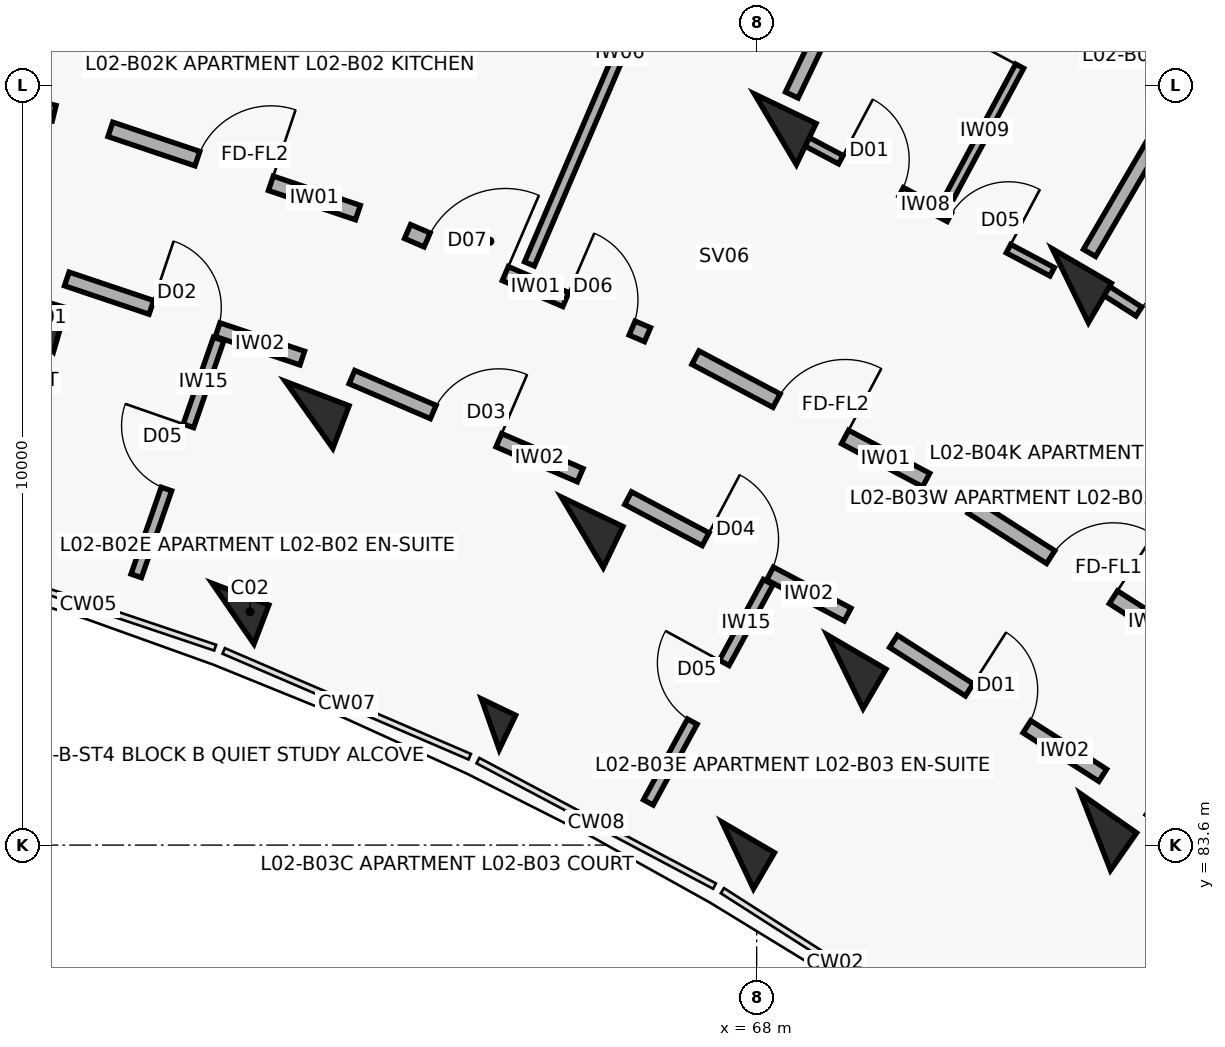
"""IFC4 building model, lengths in metres.
Left out: names, types, materials, properties, quantities, classifications, styles, units other than length and angle.
Written with IfcOpenShell. Run it as: python <this file> out.ifc"""

import sys

from ifc_helpers import new_model, si_unit, direction, frame, frame_2d, origin, origin_2d, place, context, subcontext, project, spatial, rectangle, extrude, element, fill, save


model = new_model("IFC4")
c1 = context("Model", 3, precision=1e-05, world=origin(), true_north=direction((0.0, 1.0)))
c2 = subcontext(c1, "Body", "Model", "MODEL_VIEW")
j1 = project(units=[si_unit("LENGTHUNIT", "METRE"), si_unit("PLANEANGLEUNIT", "RADIAN")], contexts=[c1])
p1 = place(None, origin())
s1 = spatial("IfcSite", under=j1, at=p1, CompositionType="ELEMENT")
p2 = place(p1, origin())
s2 = spatial("IfcBuilding", under=s1, at=p2, CompositionType="ELEMENT")
p3 = place(p2, frame((0.0, 0.0, 8.1)))
s3 = spatial("IfcBuildingStorey", under=s2, at=p3, CompositionType="ELEMENT", Elevation=8.1)
p4 = place(p3, frame((58.401, 90.508, 0.0), z_axis=(0.0, 0.0, 1.0), x_axis=(0.27966144946, 0.96009867914, 0.0)))
e1 = element("IfcColumn", 1, at=p4, inside=s3, PredefinedType="COLUMN", context=c2, shape_type="SweptSolid", body=[
    extrude(rectangle(XDim=0.6, YDim=0.9, at=origin_2d()), origin(), (0.0, 0.0, 1.0), 3.1),
])
p5 = place(p3, frame((61.111, 86.646, 0.0), z_axis=(0.0, 0.0, 1.0), x_axis=(0.357064076459, 0.934079892355, 0.0)))
e2 = element("IfcColumn", 2, at=p5, inside=s3, PredefinedType="COLUMN", context=c2, shape_type="SweptSolid", body=[
    extrude(rectangle(XDim=0.55, YDim=0.8, at=origin_2d()), origin(), (0.0, 0.0, 1.0), 3.1),
])
p6 = place(p3, frame((62.111, 89.261, 0.0), z_axis=(0.0, 0.0, 1.0), x_axis=(0.357064076459, 0.934079892355, 0.0)))
e3 = element("IfcColumn", 3, at=p6, inside=s3, PredefinedType="COLUMN", context=c2, shape_type="SweptSolid", body=[
    extrude(rectangle(XDim=0.6, YDim=0.9, at=origin_2d()), origin(), (0.0, 0.0, 1.0), 3.1),
])
p7 = place(p3, frame((64.496, 85.191, 0.0), z_axis=(0.0, 0.0, 1.0), x_axis=(0.432085748802, 0.901832526405, 0.0)))
e4 = element("IfcColumn", 4, at=p7, inside=s3, PredefinedType="COLUMN", context=c2, shape_type="SweptSolid", body=[
    extrude(rectangle(XDim=0.5, YDim=0.5, at=origin_2d()), origin(), (0.0, 0.0, 1.0), 3.1),
])
for number, where, z_axis, x_axis in (
    (5, (65.706, 87.716, 0.0), (0.0, 0.0, 1.0), (0.432, 0.902, 0.0)),
    (6, (68.246, 93.019, 0.0), (0.0, 0.0, 1.0), (0.432, 0.902, 0.0)),
):
    element("IfcColumn", number, at=place(p3, frame(where, z_axis=z_axis, x_axis=x_axis)), inside=s3, PredefinedType="COLUMN", context=c2, shape_type="SweptSolid", body=[
        extrude(rectangle(XDim=0.6, YDim=0.9, at=origin_2d()), origin(), (0.0, 0.0, 1.0), 3.1),
    ])
p8 = place(p3, frame((67.751, 83.464, 0.0), z_axis=(0.0, 0.0, 1.0), x_axis=(0.504226211181, 0.863571611366, 0.0)))
e7 = element("IfcColumn", 7, at=p8, inside=s3, PredefinedType="COLUMN", context=c2, shape_type="SweptSolid", body=[
    extrude(rectangle(XDim=0.55, YDim=0.8, at=origin_2d()), origin(), (0.0, 0.0, 1.0), 3.1),
])
for number, where, z_axis, x_axis in (
    (8, (69.163, 85.882, 0.0), (0.0, 0.0, 1.0), (0.504, 0.864, 0.0)),
    (9, (72.127, 90.96, 0.0), (0.0, 0.0, 1.0), (0.504, 0.864, 0.0)),
    (10, (72.458, 83.773, 0.0), (0.0, 0.0, 1.0), (0.573, 0.82, 0.0)),
):
    element("IfcColumn", number, at=place(p3, frame(where, z_axis=z_axis, x_axis=x_axis)), inside=s3, PredefinedType="COLUMN", context=c2, shape_type="SweptSolid", body=[
        extrude(rectangle(XDim=0.6, YDim=0.9, at=origin_2d()), origin(), (0.0, 0.0, 1.0), 3.1),
    ])
p9 = place(p3, frame((55.558, 94.022, 0.0), z_axis=(0.0, 0.0, 1.0), x_axis=(0.970719238682, -0.240216901263, 0.0)))
e11 = element("IfcWall", 11, at=p9, inside=s3, PredefinedType="SOLIDWALL", context=c2, shape_type="SweptSolid", body=[
    extrude(rectangle(XDim=3.296, YDim=0.21, at=frame_2d((1.648, 0.0))), origin(), (0.0, 0.0, 1.0), 2.08),
])
p10 = place(p9, frame((0.45, 0.0, 0.0)))
e12 = element("IfcOpeningElement", 12, at=p10, cuts=e11, PredefinedType="OPENING", context=c2, shape_type="SweptSolid", body=[
    extrude(rectangle(XDim=1.1, YDim=2.15, at=frame_2d((0.55, 1.075))), frame((0.0, 0.115, 0.0), z_axis=(0.0, -1.0, 0.0), x_axis=(1.0, 0.0, 0.0)), (0.0, 0.0, 1.0), 0.23),
])
p11 = place(p9, frame((1.726, 0.0, 0.0)))
e13 = element("IfcOpeningElement", 13, at=p11, cuts=e11, PredefinedType="OPENING", context=c2, shape_type="SweptSolid", body=[
    extrude(rectangle(XDim=1.12, YDim=2.15, at=frame_2d((0.56, 1.075))), frame((0.0, 0.115, 0.0), z_axis=(0.0, -1.0, 0.0), x_axis=(1.0, 0.0, 0.0)), (0.0, 0.0, 1.0), 0.23),
])
p12 = place(p3, frame((59.497, 93.018, 0.0), z_axis=(0.0, 0.0, 1.0), x_axis=(0.947863007629, -0.318678080151, 0.0)))
e14 = element("IfcWall", 14, at=p12, inside=s3, PredefinedType="SOLIDWALL", context=c2, shape_type="SweptSolid", body=[
    extrude(rectangle(XDim=3.436, YDim=0.2, at=frame_2d((1.718, 0.0))), origin(), (0.0, 0.0, 1.0), 2.08),
])
p13 = place(p12, frame((1.208, 0.0, 0.0)))
e15 = element("IfcOpeningElement", 15, at=p13, cuts=e14, PredefinedType="OPENING", context=c2, shape_type="SweptSolid", body=[
    extrude(rectangle(XDim=1.02, YDim=2.15, at=frame_2d((0.51, 1.075))), frame((0.0, 0.11, 0.0), z_axis=(0.0, -1.0, 0.0), x_axis=(1.0, 0.0, 0.0)), (0.0, 0.0, 1.0), 0.22),
])
p14 = place(p3, frame((58.923, 91.049, 0.0), z_axis=(0.0, 0.0, 1.0), x_axis=(0.94787351033, -0.318646839643, 0.0)))
e16 = element("IfcWall", 16, at=p14, inside=s3, PredefinedType="SOLIDWALL", context=c2, shape_type="SweptSolid", body=[
    extrude(rectangle(XDim=3.269, YDim=0.19, at=frame_2d((1.634, 0.0))), origin(), (0.0, 0.0, 1.0), 2.08),
])
p15 = place(p14, frame((1.174, 0.0, 0.0)))
e17 = element("IfcOpeningElement", 17, at=p15, cuts=e16, PredefinedType="OPENING", context=c2, shape_type="SweptSolid", body=[
    extrude(rectangle(XDim=0.92, YDim=2.1, at=frame_2d((0.46, 1.05))), frame((0.0, 0.105, 0.0), z_axis=(0.0, -1.0, 0.0), x_axis=(1.0, 0.0, 0.0)), (0.0, 0.0, 1.0), 0.21),
])
p16 = place(p3, frame((59.837, 87.143, 0.0), z_axis=(0.0, 0.0, 1.0), x_axis=(0.328629662527, 0.944458863534, 0.0)))
e18 = element("IfcWall", 18, at=p16, inside=s3, PredefinedType="PARTITIONING", context=c2, shape_type="SweptSolid", body=[
    extrude(rectangle(XDim=3.3, YDim=0.145, at=frame_2d((1.65, 0.0))), origin(), (0.0, 0.0, 1.0), 2.08),
])
p17 = place(p16, frame((1.21, 0.0, 0.0)))
e19 = element("IfcOpeningElement", 19, at=p17, cuts=e18, PredefinedType="OPENING", context=c2, shape_type="SweptSolid", body=[
    extrude(rectangle(XDim=0.88, YDim=2.1, at=frame_2d((0.44, 1.05))), frame((0.0, 0.083, 0.0), z_axis=(0.0, -1.0, 0.0), x_axis=(1.0, 0.0, 0.0)), (0.0, 0.0, 1.0), 0.165),
])
p18 = place(p3, frame((63.407, 91.673, 0.0), z_axis=(0.0, 0.0, 1.0), x_axis=(0.918718172399, -0.394913813008, 0.0)))
e20 = element("IfcWall", 20, at=p18, inside=s3, PredefinedType="SOLIDWALL", context=c2, shape_type="SweptSolid", body=[
    extrude(rectangle(XDim=3.436, YDim=0.2, at=frame_2d((1.718, 0.0))), origin(), (0.0, 0.0, 1.0), 2.08),
])
p19 = place(p18, frame((0.28, 0.0, 0.0)))
e21 = element("IfcOpeningElement", 21, at=p19, cuts=e20, PredefinedType="OPENING", context=c2, shape_type="SweptSolid", body=[
    extrude(rectangle(XDim=1.12, YDim=2.15, at=frame_2d((0.56, 1.075))), frame((0.0, 0.11, 0.0), z_axis=(0.0, -1.0, 0.0), x_axis=(1.0, 0.0, 0.0)), (0.0, 0.0, 1.0), 0.22),
])
p20 = place(p18, frame((2.266, 0.0, 0.0)))
e22 = element("IfcOpeningElement", 22, at=p20, cuts=e20, PredefinedType="OPENING", context=c2, shape_type="SweptSolid", body=[
    extrude(rectangle(XDim=0.95, YDim=2.1, at=frame_2d((0.475, 1.05))), frame((0.0, 0.11, 0.0), z_axis=(0.0, -1.0, 0.0), x_axis=(1.0, 0.0, 0.0)), (0.0, 0.0, 1.0), 0.22),
])
p21 = place(p3, frame((62.675, 89.758, 0.0), z_axis=(0.0, 0.0, 1.0), x_axis=(0.918723391052, -0.394901672235, 0.0)))
e23 = element("IfcWall", 23, at=p21, inside=s3, PredefinedType="SOLIDWALL", context=c2, shape_type="SweptSolid", body=[
    extrude(rectangle(XDim=3.269, YDim=0.19, at=frame_2d((1.634, 0.0))), origin(), (0.0, 0.0, 1.0), 2.08),
])
p22 = place(p21, frame((1.164, 0.0, 0.0)))
e24 = element("IfcOpeningElement", 24, at=p22, cuts=e23, PredefinedType="OPENING", context=c2, shape_type="SweptSolid", body=[
    extrude(rectangle(XDim=0.94, YDim=2.1, at=frame_2d((0.47, 1.05))), frame((0.0, 0.105, 0.0), z_axis=(0.0, -1.0, 0.0), x_axis=(1.0, 0.0, 0.0)), (0.0, 0.0, 1.0), 0.21),
])
p23 = place(p3, frame((65.01, 91.247, 0.0), z_axis=(0.0, 0.0, 1.0), x_axis=(0.393511564709, 0.919319666079, 0.0)))
e25 = element("IfcWall", 25, at=p23, inside=s3, PredefinedType="PARTITIONING", context=c2, shape_type="SweptSolid", body=[
    extrude(rectangle(XDim=7.95, YDim=0.14, at=frame_2d((3.975, 0.0))), origin(), (0.0, 0.0, 1.0), 2.08),
])
p24 = place(p23, frame((6.05, 0.0, 0.0)))
e26 = element("IfcOpeningElement", 26, at=p24, cuts=e25, PredefinedType="OPENING", context=c2, shape_type="SweptSolid", body=[
    extrude(rectangle(XDim=0.92, YDim=2.1, at=frame_2d((0.46, 1.05))), frame((0.0, 0.08, 0.0), z_axis=(0.0, -1.0, 0.0), x_axis=(1.0, 0.0, 0.0)), (0.0, 0.0, 1.0), 0.16),
])
p25 = place(p3, frame((67.194, 90.014, 0.0), z_axis=(0.0, 0.0, 1.0), x_axis=(0.883410853063, -0.468599258099, 0.0)))
e27 = element("IfcWall", 27, at=p25, inside=s3, PredefinedType="SOLIDWALL", context=c2, shape_type="SweptSolid", body=[
    extrude(rectangle(XDim=3.436, YDim=0.2, at=frame_2d((1.718, 0.0))), origin(), (0.0, 0.0, 1.0), 2.08),
])
p26 = place(p25, frame((1.208, 0.0, 0.0)))
e28 = element("IfcOpeningElement", 28, at=p26, cuts=e27, PredefinedType="OPENING", context=c2, shape_type="SweptSolid", body=[
    extrude(rectangle(XDim=1.02, YDim=2.15, at=frame_2d((0.51, 1.075))), frame((0.0, 0.11, 0.0), z_axis=(0.0, -1.0, 0.0), x_axis=(1.0, 0.0, 0.0)), (0.0, 0.0, 1.0), 0.22),
])
p27 = place(p3, frame((66.309, 88.165, 0.0), z_axis=(0.0, 0.0, 1.0), x_axis=(0.883444301944, -0.468536194293, 0.0)))
e29 = element("IfcWall", 29, at=p27, inside=s3, PredefinedType="SOLIDWALL", context=c2, shape_type="SweptSolid", body=[
    extrude(rectangle(XDim=3.269, YDim=0.19, at=frame_2d((1.634, 0.0))), origin(), (0.0, 0.0, 1.0), 2.08),
])
p28 = place(p27, frame((1.154, 0.0, 0.0)))
e30 = element("IfcOpeningElement", 30, at=p28, cuts=e29, PredefinedType="OPENING", context=c2, shape_type="SweptSolid", body=[
    extrude(rectangle(XDim=0.96, YDim=2.1, at=frame_2d((0.48, 1.05))), frame((0.0, 0.105, 0.0), z_axis=(0.0, -1.0, 0.0), x_axis=(1.0, 0.0, 0.0)), (0.0, 0.0, 1.0), 0.21),
])
p29 = place(p3, frame((66.575, 84.162, 0.0), z_axis=(0.0, 0.0, 1.0), x_axis=(0.477841058477, 0.878446311868, 0.0)))
e31 = element("IfcWall", 31, at=p29, inside=s3, PredefinedType="PARTITIONING", context=c2, shape_type="SweptSolid", body=[
    extrude(rectangle(XDim=3.3, YDim=0.145, at=frame_2d((1.65, 0.0))), origin(), (0.0, 0.0, 1.0), 2.08),
])
p30 = place(p29, frame((1.21, 0.0, 0.0)))
e32 = element("IfcOpeningElement", 32, at=p30, cuts=e31, PredefinedType="OPENING", context=c2, shape_type="SweptSolid", body=[
    extrude(rectangle(XDim=0.88, YDim=2.1, at=frame_2d((0.44, 1.05))), frame((0.0, 0.083, 0.0), z_axis=(0.0, -1.0, 0.0), x_axis=(1.0, 0.0, 0.0)), (0.0, 0.0, 1.0), 0.165),
])
p31 = place(p3, frame((68.533, 92.923, 0.0), z_axis=(0.0, 0.0, 1.0), x_axis=(0.88341855112, -0.46858474531, 0.0)))
e33 = element("IfcWall", 33, at=p31, inside=s3, PredefinedType="PARTITIONING", context=c2, shape_type="SweptSolid", body=[
    extrude(rectangle(XDim=3.797, YDim=0.125, at=frame_2d((1.898, 0.0))), origin(), (0.0, 0.0, 1.0), 2.08),
])
p32 = place(p31, frame((0.65, 0.0, 0.0)))
e34 = element("IfcOpeningElement", 34, at=p32, cuts=e33, PredefinedType="OPENING", context=c2, shape_type="SweptSolid", body=[
    extrude(rectangle(XDim=0.9, YDim=2.1, at=frame_2d((0.45, 1.05))), frame((0.0, 0.073, 0.0), z_axis=(0.0, -1.0, 0.0), x_axis=(1.0, 0.0, 0.0)), (0.0, 0.0, 1.0), 0.145),
])
p33 = place(p31, frame((2.267, 0.0, 0.0)))
e35 = element("IfcOpeningElement", 35, at=p33, cuts=e33, PredefinedType="OPENING", context=c2, shape_type="SweptSolid", body=[
    extrude(rectangle(XDim=0.88, YDim=2.1, at=frame_2d((0.44, 1.05))), frame((0.0, 0.073, 0.0), z_axis=(0.0, -1.0, 0.0), x_axis=(1.0, 0.0, 0.0)), (0.0, 0.0, 1.0), 0.145),
])
p34 = place(p3, frame((70.541, 92.135, 0.0), z_axis=(0.0, 0.0, 1.0), x_axis=(0.472542158723, 0.881308066586, 0.0)))
e36 = element("IfcWall", 36, at=p34, inside=s3, PredefinedType="PARTITIONING", context=c2, shape_type="SweptSolid", body=[
    extrude(rectangle(XDim=4.9, YDim=0.12, at=frame_2d((2.45, 0.0))), origin(), (0.0, 0.0, 1.0), 2.08),
])
p35 = place(p34, frame((1.945, 0.0, 0.0)))
e37 = element("IfcOpeningElement", 37, at=p35, cuts=e36, PredefinedType="OPENING", context=c2, shape_type="SweptSolid", body=[
    extrude(rectangle(XDim=1.01, YDim=2.1, at=frame_2d((0.505, 1.05))), frame((0.0, 0.07, 0.0), z_axis=(0.0, -1.0, 0.0), x_axis=(1.0, 0.0, 0.0)), (0.0, 0.0, 1.0), 0.14),
])
p36 = place(p3, frame((68.462, 93.469, 0.0), z_axis=(0.0, 0.0, 1.0), x_axis=(0.432086898897, 0.901831975371, 0.0)))
e38 = element("IfcWall", 38, at=p36, inside=s3, PredefinedType="SOLIDWALL", context=c2, shape_type="SweptSolid", body=[
    extrude(rectangle(XDim=4.35, YDim=0.185, at=frame_2d((2.175, 0.0))), origin(), (0.0, 0.0, 1.0), 2.08),
])
p37 = place(p3, frame((70.834, 88.051, 0.0), z_axis=(0.0, 0.0, 1.0), x_axis=(0.842257205985, -0.539075874963, 0.0)))
e39 = element("IfcWall", 39, at=p37, inside=s3, PredefinedType="SOLIDWALL", context=c2, shape_type="SweptSolid", body=[
    extrude(rectangle(XDim=3.436, YDim=0.2, at=frame_2d((1.718, 0.0))), origin(), (0.0, 0.0, 1.0), 2.08),
])
p38 = place(p37, frame((1.228, 0.0, 0.0)))
e40 = element("IfcOpeningElement", 40, at=p38, cuts=e39, PredefinedType="OPENING", context=c2, shape_type="SweptSolid", body=[
    extrude(rectangle(XDim=0.98, YDim=2.15, at=frame_2d((0.49, 1.075))), frame((0.0, 0.11, 0.0), z_axis=(0.0, -1.0, 0.0), x_axis=(1.0, 0.0, 0.0)), (0.0, 0.0, 1.0), 0.22),
])
p39 = place(p3, frame((69.8, 86.281, 0.0), z_axis=(0.0, 0.0, 1.0), x_axis=(0.842225276846, -0.539125758095, 0.0)))
e41 = element("IfcWall", 41, at=p39, inside=s3, PredefinedType="SOLIDWALL", context=c2, shape_type="SweptSolid", body=[
    extrude(rectangle(XDim=3.269, YDim=0.19, at=frame_2d((1.634, 0.0))), origin(), (0.0, 0.0, 1.0), 2.08),
])
p40 = place(p39, frame((1.184, 0.0, 0.0)))
e42 = element("IfcOpeningElement", 42, at=p40, cuts=e41, PredefinedType="OPENING", context=c2, shape_type="SweptSolid", body=[
    extrude(rectangle(XDim=0.9, YDim=2.1, at=frame_2d((0.45, 1.05))), frame((0.0, 0.105, 0.0), z_axis=(0.0, -1.0, 0.0), x_axis=(1.0, 0.0, 0.0)), (0.0, 0.0, 1.0), 0.21),
])
p41 = place(p3, frame((72.481, 90.971, 0.0), z_axis=(0.0, 0.0, 1.0), x_axis=(0.842238809758, -0.53910461632, 0.0)))
e43 = element("IfcWall", 43, at=p41, inside=s3, PredefinedType="PARTITIONING", context=c2, shape_type="SweptSolid", body=[
    extrude(rectangle(XDim=3.81, YDim=0.14, at=frame_2d((1.905, 0.0))), origin(), (0.0, 0.0, 1.0), 2.08),
])
p42 = place(p41, frame((0.65, 0.0, 0.0)))
e44 = element("IfcOpeningElement", 44, at=p42, cuts=e43, PredefinedType="OPENING", context=c2, shape_type="SweptSolid", body=[
    extrude(rectangle(XDim=0.9, YDim=2.1, at=frame_2d((0.45, 1.05))), frame((0.0, 0.08, 0.0), z_axis=(0.0, -1.0, 0.0), x_axis=(1.0, 0.0, 0.0)), (0.0, 0.0, 1.0), 0.16),
])
p43 = place(p41, frame((2.28, 0.0, 0.0)))
e45 = element("IfcOpeningElement", 45, at=p43, cuts=e43, PredefinedType="OPENING", context=c2, shape_type="SweptSolid", body=[
    extrude(rectangle(XDim=0.88, YDim=2.1, at=frame_2d((0.44, 1.05))), frame((0.0, 0.08, 0.0), z_axis=(0.0, -1.0, 0.0), x_axis=(1.0, 0.0, 0.0)), (0.0, 0.0, 1.0), 0.16),
])
p44 = place(p3, frame((72.379, 91.392, 0.0), z_axis=(0.0, 0.0, 1.0), x_axis=(0.504216452091, 0.863577309475, 0.0)))
e46 = element("IfcWall", 46, at=p44, inside=s3, PredefinedType="SOLIDWALL", context=c2, shape_type="SweptSolid", body=[
    extrude(rectangle(XDim=4.35, YDim=0.185, at=frame_2d((2.175, 0.0))), origin(), (0.0, 0.0, 1.0), 2.08),
])
p45 = place(p13, origin())
e47 = element("IfcDoor", 47, at=p45, inside=s3, OperationType="SINGLE_SWING_RIGHT", PredefinedType="DOOR", context=c2, shape_type="SweptSolid", body=[
    extrude(rectangle(XDim=1.02, YDim=2.15, at=frame_2d((0.51, 1.075))), frame((0.0, 0.025, 0.0), z_axis=(0.0, -1.0, 0.0), x_axis=(1.0, 0.0, 0.0)), (0.0, 0.0, 1.0), 0.05),
])
fill(e15, e47)
p46 = place(p15, origin())
e48 = element("IfcDoor", 48, at=p46, inside=s3, OperationType="SINGLE_SWING_LEFT", PredefinedType="DOOR", context=c2, shape_type="SweptSolid", body=[
    extrude(rectangle(XDim=0.92, YDim=2.1, at=frame_2d((0.46, 1.05))), frame((0.0, 0.025, 0.0), z_axis=(0.0, -1.0, 0.0), x_axis=(1.0, 0.0, 0.0)), (0.0, 0.0, 1.0), 0.05),
])
fill(e17, e48)
p47 = place(p17, origin())
e49 = element("IfcDoor", 49, at=p47, inside=s3, OperationType="SINGLE_SWING_RIGHT", PredefinedType="DOOR", context=c2, shape_type="SweptSolid", body=[
    extrude(rectangle(XDim=0.88, YDim=2.1, at=frame_2d((0.44, 1.05))), frame((0.0, 0.025, 0.0), z_axis=(0.0, -1.0, 0.0), x_axis=(1.0, 0.0, 0.0)), (0.0, 0.0, 1.0), 0.05),
])
fill(e19, e49)
p48 = place(p19, origin())
e50 = element("IfcDoor", 50, at=p48, inside=s3, OperationType="SINGLE_SWING_RIGHT", PredefinedType="DOOR", context=c2, shape_type="SweptSolid", body=[
    extrude(rectangle(XDim=1.12, YDim=2.15, at=frame_2d((0.56, 1.075))), frame((0.0, 0.025, 0.0), z_axis=(0.0, -1.0, 0.0), x_axis=(1.0, 0.0, 0.0)), (0.0, 0.0, 1.0), 0.05),
])
fill(e21, e50)
p49 = place(p20, origin())
e51 = element("IfcDoor", 51, at=p49, inside=s3, OperationType="SINGLE_SWING_LEFT", PredefinedType="DOOR", context=c2, shape_type="SweptSolid", body=[
    extrude(rectangle(XDim=0.95, YDim=2.1, at=frame_2d((0.475, 1.05))), frame((0.0, 0.025, 0.0), z_axis=(0.0, -1.0, 0.0), x_axis=(1.0, 0.0, 0.0)), (0.0, 0.0, 1.0), 0.05),
])
fill(e22, e51)
p50 = place(p22, origin())
e52 = element("IfcDoor", 52, at=p50, inside=s3, OperationType="SINGLE_SWING_RIGHT", PredefinedType="DOOR", context=c2, shape_type="SweptSolid", body=[
    extrude(rectangle(XDim=0.94, YDim=2.1, at=frame_2d((0.47, 1.05))), frame((0.0, 0.025, 0.0), z_axis=(0.0, -1.0, 0.0), x_axis=(1.0, 0.0, 0.0)), (0.0, 0.0, 1.0), 0.05),
])
fill(e24, e52)
p51 = place(p26, origin())
e53 = element("IfcDoor", 53, at=p51, inside=s3, OperationType="SINGLE_SWING_RIGHT", PredefinedType="DOOR", context=c2, shape_type="SweptSolid", body=[
    extrude(rectangle(XDim=1.02, YDim=2.15, at=frame_2d((0.51, 1.075))), frame((0.0, 0.025, 0.0), z_axis=(0.0, -1.0, 0.0), x_axis=(1.0, 0.0, 0.0)), (0.0, 0.0, 1.0), 0.05),
])
fill(e28, e53)
p52 = place(p28, origin())
e54 = element("IfcDoor", 54, at=p52, inside=s3, OperationType="SINGLE_SWING_LEFT", PredefinedType="DOOR", context=c2, shape_type="SweptSolid", body=[
    extrude(rectangle(XDim=0.96, YDim=2.1, at=frame_2d((0.48, 1.05))), frame((0.0, 0.025, 0.0), z_axis=(0.0, -1.0, 0.0), x_axis=(1.0, 0.0, 0.0)), (0.0, 0.0, 1.0), 0.05),
])
fill(e30, e54)
p53 = place(p30, origin())
e55 = element("IfcDoor", 55, at=p53, inside=s3, OperationType="SINGLE_SWING_RIGHT", PredefinedType="DOOR", context=c2, shape_type="SweptSolid", body=[
    extrude(rectangle(XDim=0.88, YDim=2.1, at=frame_2d((0.44, 1.05))), frame((0.0, 0.025, 0.0), z_axis=(0.0, -1.0, 0.0), x_axis=(1.0, 0.0, 0.0)), (0.0, 0.0, 1.0), 0.05),
])
fill(e32, e55)
p54 = place(p32, origin())
e56 = element("IfcDoor", 56, at=p54, inside=s3, OperationType="SINGLE_SWING_LEFT", PredefinedType="DOOR", context=c2, shape_type="SweptSolid", body=[
    extrude(rectangle(XDim=0.9, YDim=2.1, at=frame_2d((0.45, 1.05))), frame((0.0, 0.025, 0.0), z_axis=(0.0, -1.0, 0.0), x_axis=(1.0, 0.0, 0.0)), (0.0, 0.0, 1.0), 0.05),
])
fill(e34, e56)
p55 = place(p33, origin())
e57 = element("IfcDoor", 57, at=p55, inside=s3, OperationType="SINGLE_SWING_RIGHT", PredefinedType="DOOR", context=c2, shape_type="SweptSolid", body=[
    extrude(rectangle(XDim=0.88, YDim=2.1, at=frame_2d((0.44, 1.05))), frame((0.0, 0.025, 0.0), z_axis=(0.0, -1.0, 0.0), x_axis=(1.0, 0.0, 0.0)), (0.0, 0.0, 1.0), 0.05),
])
fill(e35, e57)
p56 = place(p35, origin())
e58 = element("IfcDoor", 58, at=p56, inside=s3, OperationType="SINGLE_SWING_LEFT", PredefinedType="DOOR", context=c2, shape_type="SweptSolid", body=[
    extrude(rectangle(XDim=1.01, YDim=2.1, at=frame_2d((0.505, 1.05))), frame((0.0, 0.025, 0.0), z_axis=(0.0, -1.0, 0.0), x_axis=(1.0, 0.0, 0.0)), (0.0, 0.0, 1.0), 0.05),
])
fill(e37, e58)
p57 = place(p38, origin())
e59 = element("IfcDoor", 59, at=p57, inside=s3, OperationType="SINGLE_SWING_RIGHT", PredefinedType="DOOR", context=c2, shape_type="SweptSolid", body=[
    extrude(rectangle(XDim=0.98, YDim=2.15, at=frame_2d((0.49, 1.075))), frame((0.0, 0.025, 0.0), z_axis=(0.0, -1.0, 0.0), x_axis=(1.0, 0.0, 0.0)), (0.0, 0.0, 1.0), 0.05),
])
fill(e40, e59)
p58 = place(p40, origin())
e60 = element("IfcDoor", 60, at=p58, inside=s3, OperationType="SINGLE_SWING_LEFT", PredefinedType="DOOR", context=c2, shape_type="SweptSolid", body=[
    extrude(rectangle(XDim=0.9, YDim=2.1, at=frame_2d((0.45, 1.05))), frame((0.0, 0.025, 0.0), z_axis=(0.0, -1.0, 0.0), x_axis=(1.0, 0.0, 0.0)), (0.0, 0.0, 1.0), 0.05),
])
fill(e42, e60)
p59 = place(p42, origin())
e61 = element("IfcDoor", 61, at=p59, inside=s3, OperationType="SINGLE_SWING_RIGHT", PredefinedType="DOOR", context=c2, shape_type="SweptSolid", body=[
    extrude(rectangle(XDim=0.9, YDim=2.1, at=frame_2d((0.45, 1.05))), frame((0.0, 0.025, 0.0), z_axis=(0.0, -1.0, 0.0), x_axis=(1.0, 0.0, 0.0)), (0.0, 0.0, 1.0), 0.05),
])
fill(e44, e61)
save(model, sys.argv[1])
